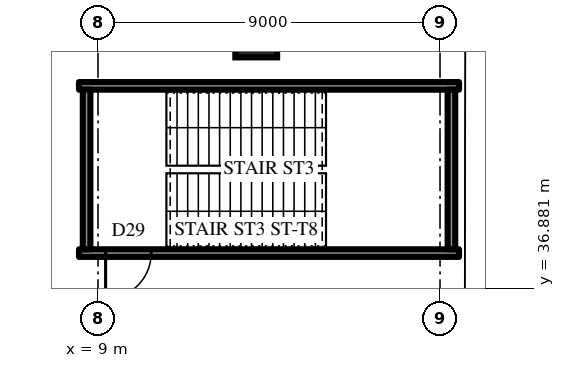
"""IFC4 building model, lengths in metres.
Left out: names, types, materials, properties, quantities, classifications, styles, units other than length and angle.
Written with IfcOpenShell. Run it as: python <this file> out.ifc"""

import sys

from ifc_helpers import new_model, si_unit, direction, frame, frame_2d, origin, origin_2d, place, context, subcontext, project, spatial, rectangle, extrude, element, fill, save


model = new_model("IFC4")
c1 = context("Model", 3, precision=1e-05, world=origin(), true_north=direction((0.0, 1.0)))
c2 = subcontext(c1, "Body", "Model", "MODEL_VIEW")
j1 = project(units=[si_unit("LENGTHUNIT", "METRE"), si_unit("PLANEANGLEUNIT", "RADIAN")], contexts=[c1])
p1 = place(None, origin())
s1 = spatial("IfcSite", under=j1, at=p1, CompositionType="ELEMENT")
p2 = place(p1, origin())
s2 = spatial("IfcBuilding", under=s1, at=p2, CompositionType="ELEMENT")
p3 = place(p2, frame((0.0, 0.0, 13.0)))
s3 = spatial("IfcBuildingStorey", under=s2, at=p3, CompositionType="ELEMENT", Elevation=13.0)
p4 = place(p3, frame((8.5, 37.8, 0.0), z_axis=(0.0, 0.0, 1.0), x_axis=(1.0, 0.0, 0.0)))
e1 = element("IfcWall", 1, at=p4, inside=s3, PredefinedType="SHEAR", context=c2, shape_type="SweptSolid", body=[
    extrude(rectangle(XDim=10.0, YDim=0.2, at=frame_2d((5.0, 0.0))), origin(), (0.0, 0.0, 1.0), 5.5),
])
p5 = place(p4, frame((0.7, 0.0, 0.0)))
e2 = element("IfcOpeningElement", 2, at=p5, cuts=e1, PredefinedType="OPENING", context=c2, shape_type="SweptSolid", body=[
    extrude(rectangle(XDim=1.2, YDim=2.2, at=frame_2d((0.6, 1.1))), frame((0.0, 0.11, 0.0), z_axis=(0.0, -1.0, 0.0), x_axis=(1.0, 0.0, 0.0)), (0.0, 0.0, 1.0), 0.22),
])
p6 = place(p3, frame((18.5, 42.2, 0.0), z_axis=(0.0, 0.0, 1.0), x_axis=(-1.0, 0.0, 0.0)))
e3 = element("IfcWall", 3, at=p6, inside=s3, PredefinedType="SHEAR", context=c2, shape_type="SweptSolid", body=[
    extrude(rectangle(XDim=10.0, YDim=0.2, at=frame_2d((5.0, 0.0))), origin(), (0.0, 0.0, 1.0), 5.5),
])
for number, where, z_axis, x_axis in (
    (4, (8.7, 42.1, 0.0), (0.0, 0.0, 1.0), (0.0, -1.0, 0.0)),
    (5, (18.3, 37.9, 0.0), (0.0, 0.0, 1.0), (0.0, 1.0, 0.0)),
):
    element("IfcWall", number, at=place(p3, frame(where, z_axis=z_axis, x_axis=x_axis)), inside=s3, PredefinedType="SHEAR", context=c2, shape_type="SweptSolid", body=[
        extrude(rectangle(XDim=4.2, YDim=0.2, at=frame_2d((2.1, 0.0))), origin(), (0.0, 0.0, 1.0), 5.5),
    ])
p7 = place(p3, frame((13.164, 43.5, 0.0), z_axis=(0.0, 0.0, 1.0), x_axis=(-1.0, 0.0, 0.0)))
e6 = element("IfcColumn", 6, at=p7, inside=s3, PredefinedType="COLUMN", context=c2, shape_type="SweptSolid", body=[
    extrude(rectangle(XDim=1.1, YDim=1.1, at=origin_2d()), origin(), (0.0, 0.0, 1.0), 5.5),
])
p8 = place(p5, frame((1.2, 0.0, 0.0), z_axis=(0.0, 0.0, 1.0), x_axis=(-1.0, 0.0, 0.0)))
e7 = element("IfcDoor", 7, at=p8, inside=s3, OperationType="SINGLE_SWING_LEFT", PredefinedType="DOOR", context=c2, shape_type="SweptSolid", body=[
    extrude(rectangle(XDim=1.2, YDim=2.2, at=frame_2d((0.6, 1.1))), frame((0.0, 0.025, 0.0), z_axis=(0.0, -1.0, 0.0), x_axis=(1.0, 0.0, 0.0)), (0.0, 0.0, 1.0), 0.05),
])
fill(e2, e7)
save(model, sys.argv[1])
